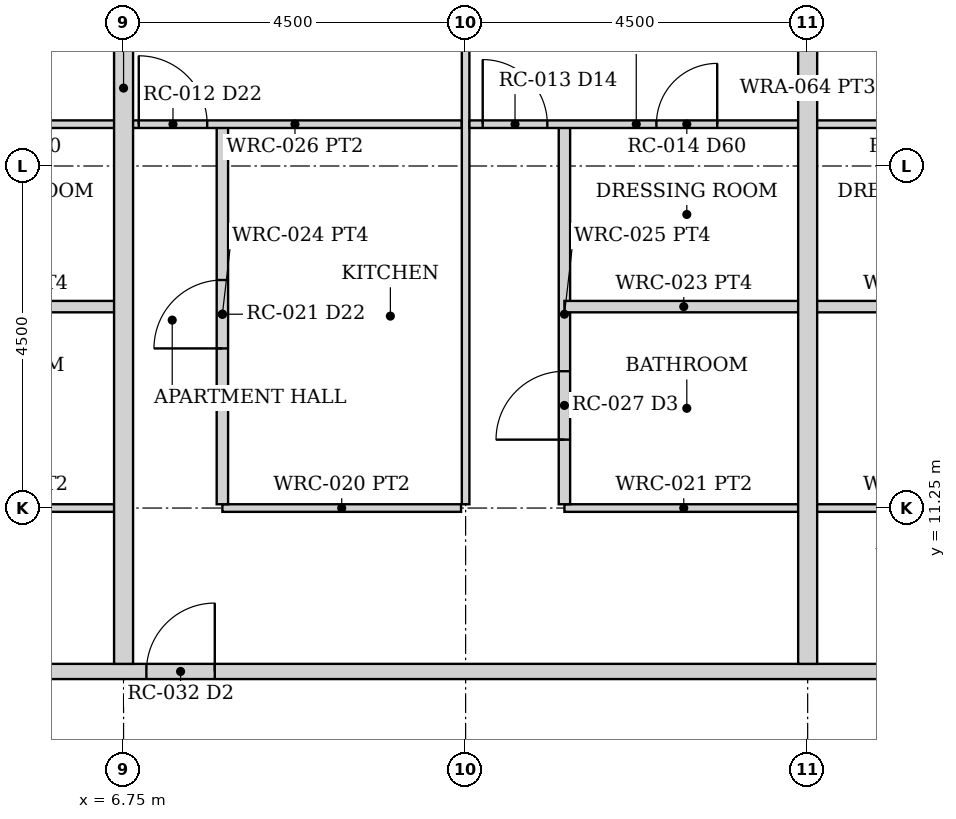
"""IFC4 building model, lengths in metres.
Left out: names, types, materials, properties, quantities, classifications, styles, units other than length and angle.
Written with IfcOpenShell. Run it as: python <this file> out.ifc"""

import sys

from ifc_helpers import new_model, si_unit, direction, frame, frame_2d, origin, place, context, subcontext, project, spatial, rectangle, extrude, element, fill, save


model = new_model("IFC4")
c1 = context("Model", 3, precision=1e-05, world=origin(), true_north=direction((0.0, 1.0)))
c2 = subcontext(c1, "Body", "Model", "MODEL_VIEW")
j1 = project(units=[si_unit("LENGTHUNIT", "METRE"), si_unit("PLANEANGLEUNIT", "RADIAN")], contexts=[c1])
p1 = place(None, origin())
s1 = spatial("IfcSite", under=j1, at=p1, CompositionType="ELEMENT")
p2 = place(p1, origin())
s2 = spatial("IfcBuilding", under=s1, at=p2, CompositionType="ELEMENT")
p3 = place(p2, frame((0.0, 0.0, 47.5)))
s3 = spatial("IfcBuildingStorey", under=s2, at=p3, CompositionType="ELEMENT", Elevation=47.5)
p4 = place(p3, frame((-24.55, 9.1, 0.0), z_axis=(0.0, 0.0, 1.0), x_axis=(1.0, 0.0, 0.0)))
e1 = element("IfcWall", 1, at=p4, inside=s3, PredefinedType="PARTITIONING", context=c2, shape_type="SweptSolid", body=[
    extrude(rectangle(XDim=49.1, YDim=0.2, at=frame_2d((24.55, 0.0))), origin(), (0.0, 0.0, 1.0), 2.373),
])
p5 = place(p4, frame((5.1, 0.0, 0.0)))
e2 = element("IfcOpeningElement", 2, at=p5, cuts=e1, PredefinedType="OPENING", context=c2, shape_type="SweptSolid", body=[
    extrude(rectangle(XDim=0.9, YDim=2.1, at=frame_2d((0.45, 1.05))), frame((0.0, 0.11, 0.0), z_axis=(0.0, -1.0, 0.0), x_axis=(1.0, 0.0, 0.0)), (0.0, 0.0, 1.0), 0.22),
])
p6 = place(p4, frame((13.6, 0.0, 0.0)))
e3 = element("IfcOpeningElement", 3, at=p6, cuts=e1, PredefinedType="OPENING", context=c2, shape_type="SweptSolid", body=[
    extrude(rectangle(XDim=0.9, YDim=2.1, at=frame_2d((0.45, 1.05))), frame((0.0, 0.11, 0.0), z_axis=(0.0, -1.0, 0.0), x_axis=(1.0, 0.0, 0.0)), (0.0, 0.0, 1.0), 0.22),
])
p7 = place(p4, frame((18.1, 0.0, 0.0)))
e4 = element("IfcOpeningElement", 4, at=p7, cuts=e1, PredefinedType="OPENING", context=c2, shape_type="SweptSolid", body=[
    extrude(rectangle(XDim=0.9, YDim=2.1, at=frame_2d((0.45, 1.05))), frame((0.0, 0.11, 0.0), z_axis=(0.0, -1.0, 0.0), x_axis=(1.0, 0.0, 0.0)), (0.0, 0.0, 1.0), 0.22),
])
p8 = place(p4, frame((31.6, 0.0, 0.0)))
e5 = element("IfcOpeningElement", 5, at=p8, cuts=e1, PredefinedType="OPENING", context=c2, shape_type="SweptSolid", body=[
    extrude(rectangle(XDim=0.9, YDim=2.1, at=frame_2d((0.45, 1.05))), frame((0.0, 0.11, 0.0), z_axis=(0.0, -1.0, 0.0), x_axis=(1.0, 0.0, 0.0)), (0.0, 0.0, 1.0), 0.22),
])
p9 = place(p4, frame((43.1, 0.0, 0.0)))
e6 = element("IfcOpeningElement", 6, at=p9, cuts=e1, PredefinedType="OPENING", context=c2, shape_type="SweptSolid", body=[
    extrude(rectangle(XDim=0.9, YDim=2.1, at=frame_2d((0.45, 1.05))), frame((0.0, 0.11, 0.0), z_axis=(0.0, -1.0, 0.0), x_axis=(1.0, 0.0, 0.0)), (0.0, 0.0, 1.0), 0.22),
])
p10 = place(p3, frame((3.55, 11.25, 0.0), z_axis=(0.0, 0.0, 1.0), x_axis=(1.0, 0.0, 0.0)))
e7 = element("IfcWall", 7, at=p10, inside=s3, PredefinedType="PARTITIONING", context=c2, shape_type="SweptSolid", body=[
    extrude(rectangle(XDim=3.14, YDim=0.1, at=frame_2d((1.57, 0.0))), origin(), (0.0, 0.0, 1.0), 2.373),
])
p11 = place(p3, frame((2.3, 16.3, 0.0), z_axis=(0.0, 0.0, 1.0), x_axis=(1.0, 0.0, 0.0)))
e8 = element("IfcWall", 8, at=p11, inside=s3, PredefinedType="PARTITIONING", context=c2, shape_type="SweptSolid", body=[
    extrude(rectangle(XDim=4.39, YDim=0.1, at=frame_2d((2.195, 0.0))), origin(), (0.0, 0.0, 1.0), 2.373),
])
p12 = place(p11, frame((0.175, 0.0, 0.0)))
e9 = element("IfcOpeningElement", 9, at=p12, cuts=e8, PredefinedType="OPENING", context=c2, shape_type="SweptSolid", body=[
    extrude(rectangle(XDim=0.85, YDim=2.1, at=frame_2d((0.425, 1.05))), frame((0.0, 0.06, 0.0), z_axis=(0.0, -1.0, 0.0), x_axis=(1.0, 0.0, 0.0)), (0.0, 0.0, 1.0), 0.12),
])
p13 = place(p11, frame((2.46, 0.0, 0.0)))
e10 = element("IfcOpeningElement", 10, at=p13, cuts=e8, PredefinedType="OPENING", context=c2, shape_type="SweptSolid", body=[
    extrude(rectangle(XDim=0.8, YDim=2.1, at=frame_2d((0.4, 1.05))), frame((0.0, 0.06, 0.0), z_axis=(0.0, -1.0, 0.0), x_axis=(1.0, 0.0, 0.0)), (0.0, 0.0, 1.0), 0.12),
])
p14 = place(p3, frame((3.55, 13.9, 0.0), z_axis=(0.0, 0.0, 1.0), x_axis=(1.0, 0.0, 0.0)))
e11 = element("IfcWall", 11, at=p14, inside=s3, PredefinedType="PARTITIONING", context=c2, shape_type="SweptSolid", body=[
    extrude(rectangle(XDim=3.14, YDim=0.15, at=frame_2d((1.57, 0.0))), origin(), (0.0, 0.0, 1.0), 2.373),
])
p15 = place(p3, frame((8.05, 11.25, 0.0), z_axis=(0.0, 0.0, 1.0), x_axis=(1.0, 0.0, 0.0)))
e12 = element("IfcWall", 12, at=p15, inside=s3, PredefinedType="PARTITIONING", context=c2, shape_type="SweptSolid", body=[
    extrude(rectangle(XDim=3.14, YDim=0.1, at=frame_2d((1.57, 0.0))), origin(), (0.0, 0.0, 1.0), 2.373),
])
p16 = place(p3, frame((8.05, 11.3, 0.0), z_axis=(0.0, 0.0, 1.0), x_axis=(0.0, 1.0, 0.0)))
e13 = element("IfcWall", 13, at=p16, inside=s3, PredefinedType="PARTITIONING", context=c2, shape_type="SweptSolid", body=[
    extrude(rectangle(XDim=5.0, YDim=0.15, at=frame_2d((2.5, 0.0))), origin(), (0.0, 0.0, 1.0), 2.373),
])
p17 = place(p16, frame((2.05, 0.0, 0.0)))
e14 = element("IfcOpeningElement", 14, at=p17, cuts=e13, PredefinedType="OPENING", context=c2, shape_type="SweptSolid", body=[
    extrude(rectangle(XDim=0.9, YDim=2.1, at=frame_2d((0.45, 1.05))), frame((0.0, 0.085, 0.0), z_axis=(0.0, -1.0, 0.0), x_axis=(1.0, 0.0, 0.0)), (0.0, 0.0, 1.0), 0.17),
])
p18 = place(p3, frame((6.81, 16.3, 0.0), z_axis=(0.0, 0.0, 1.0), x_axis=(1.0, 0.0, 0.0)))
e15 = element("IfcWall", 15, at=p18, inside=s3, PredefinedType="PARTITIONING", context=c2, shape_type="SweptSolid", body=[
    extrude(rectangle(XDim=4.39, YDim=0.1, at=frame_2d((2.195, 0.0))), origin(), (0.0, 0.0, 1.0), 2.373),
])
p19 = place(p18, frame((0.14, 0.0, 0.0)))
e16 = element("IfcOpeningElement", 16, at=p19, cuts=e15, PredefinedType="OPENING", context=c2, shape_type="SweptSolid", body=[
    extrude(rectangle(XDim=0.9, YDim=2.1, at=frame_2d((0.45, 1.05))), frame((0.0, 0.06, 0.0), z_axis=(0.0, -1.0, 0.0), x_axis=(1.0, 0.0, 0.0)), (0.0, 0.0, 1.0), 0.12),
])
p20 = place(p3, frame((11.25, 11.3, 0.0), z_axis=(0.0, 0.0, 1.0), x_axis=(0.0, 1.0, 0.0)))
e17 = element("IfcWall", 17, at=p20, inside=s3, PredefinedType="PARTITIONING", context=c2, shape_type="SweptSolid", body=[
    extrude(rectangle(XDim=13.05, YDim=0.1, at=frame_2d((6.525, 0.0))), origin(), (0.0, 0.0, 1.0), 2.373),
])
p21 = place(p3, frame((12.55, 11.25, 0.0), z_axis=(0.0, 0.0, 1.0), x_axis=(1.0, 0.0, 0.0)))
e18 = element("IfcWall", 18, at=p21, inside=s3, PredefinedType="PARTITIONING", context=c2, shape_type="SweptSolid", body=[
    extrude(rectangle(XDim=3.14, YDim=0.1, at=frame_2d((1.57, 0.0))), origin(), (0.0, 0.0, 1.0), 2.373),
])
p22 = place(p3, frame((12.55, 11.3, 0.0), z_axis=(0.0, 0.0, 1.0), x_axis=(0.0, 1.0, 0.0)))
e19 = element("IfcWall", 19, at=p22, inside=s3, PredefinedType="PARTITIONING", context=c2, shape_type="SweptSolid", body=[
    extrude(rectangle(XDim=5.0, YDim=0.15, at=frame_2d((2.5, 0.0))), origin(), (0.0, 0.0, 1.0), 2.373),
])
p23 = place(p22, frame((0.85, 0.0, 0.0)))
e20 = element("IfcOpeningElement", 20, at=p23, cuts=e19, PredefinedType="OPENING", context=c2, shape_type="SweptSolid", body=[
    extrude(rectangle(XDim=0.9, YDim=2.1, at=frame_2d((0.45, 1.05))), frame((0.0, 0.085, 0.0), z_axis=(0.0, -1.0, 0.0), x_axis=(1.0, 0.0, 0.0)), (0.0, 0.0, 1.0), 0.17),
])
p24 = place(p3, frame((11.3, 16.3, 0.0), z_axis=(0.0, 0.0, 1.0), x_axis=(1.0, 0.0, 0.0)))
e21 = element("IfcWall", 21, at=p24, inside=s3, PredefinedType="PARTITIONING", context=c2, shape_type="SweptSolid", body=[
    extrude(rectangle(XDim=4.39, YDim=0.1, at=frame_2d((2.195, 0.0))), origin(), (0.0, 0.0, 1.0), 2.373),
])
p25 = place(p24, frame((0.175, 0.0, 0.0)))
e22 = element("IfcOpeningElement", 22, at=p25, cuts=e21, PredefinedType="OPENING", context=c2, shape_type="SweptSolid", body=[
    extrude(rectangle(XDim=0.85, YDim=2.1, at=frame_2d((0.425, 1.05))), frame((0.0, 0.06, 0.0), z_axis=(0.0, -1.0, 0.0), x_axis=(1.0, 0.0, 0.0)), (0.0, 0.0, 1.0), 0.12),
])
p26 = place(p24, frame((2.46, 0.0, 0.0)))
e23 = element("IfcOpeningElement", 23, at=p26, cuts=e21, PredefinedType="OPENING", context=c2, shape_type="SweptSolid", body=[
    extrude(rectangle(XDim=0.8, YDim=2.1, at=frame_2d((0.4, 1.05))), frame((0.0, 0.06, 0.0), z_axis=(0.0, -1.0, 0.0), x_axis=(1.0, 0.0, 0.0)), (0.0, 0.0, 1.0), 0.12),
])
p27 = place(p3, frame((12.55, 13.9, 0.0), z_axis=(0.0, 0.0, 1.0), x_axis=(1.0, 0.0, 0.0)))
e24 = element("IfcWall", 24, at=p27, inside=s3, PredefinedType="PARTITIONING", context=c2, shape_type="SweptSolid", body=[
    extrude(rectangle(XDim=3.14, YDim=0.15, at=frame_2d((1.57, 0.0))), origin(), (0.0, 0.0, 1.0), 2.373),
])
p28 = place(p3, frame((15.81, 11.25, 0.0), z_axis=(0.0, 0.0, 1.0), x_axis=(1.0, 0.0, 0.0)))
e25 = element("IfcWall", 25, at=p28, inside=s3, PredefinedType="PARTITIONING", context=c2, shape_type="SweptSolid", body=[
    extrude(rectangle(XDim=3.14, YDim=0.1, at=frame_2d((1.57, 0.0))), origin(), (0.0, 0.0, 1.0), 2.373),
])
p29 = place(p3, frame((15.81, 16.3, 0.0), z_axis=(0.0, 0.0, 1.0), x_axis=(1.0, 0.0, 0.0)))
e26 = element("IfcWall", 26, at=p29, inside=s3, PredefinedType="PARTITIONING", context=c2, shape_type="SweptSolid", body=[
    extrude(rectangle(XDim=4.39, YDim=0.1, at=frame_2d((2.195, 0.0))), origin(), (0.0, 0.0, 1.0), 2.373),
])
p30 = place(p29, frame((3.365, 0.0, 0.0)))
e27 = element("IfcOpeningElement", 27, at=p30, cuts=e26, PredefinedType="OPENING", context=c2, shape_type="SweptSolid", body=[
    extrude(rectangle(XDim=0.85, YDim=2.1, at=frame_2d((0.425, 1.05))), frame((0.0, 0.06, 0.0), z_axis=(0.0, -1.0, 0.0), x_axis=(1.0, 0.0, 0.0)), (0.0, 0.0, 1.0), 0.12),
])
p31 = place(p29, frame((1.13, 0.0, 0.0)))
e28 = element("IfcOpeningElement", 28, at=p31, cuts=e26, PredefinedType="OPENING", context=c2, shape_type="SweptSolid", body=[
    extrude(rectangle(XDim=0.8, YDim=2.1, at=frame_2d((0.4, 1.05))), frame((0.0, 0.06, 0.0), z_axis=(0.0, -1.0, 0.0), x_axis=(1.0, 0.0, 0.0)), (0.0, 0.0, 1.0), 0.12),
])
p32 = place(p3, frame((15.81, 13.9, 0.0), z_axis=(0.0, 0.0, 1.0), x_axis=(1.0, 0.0, 0.0)))
e29 = element("IfcWall", 29, at=p32, inside=s3, PredefinedType="PARTITIONING", context=c2, shape_type="SweptSolid", body=[
    extrude(rectangle(XDim=3.14, YDim=0.15, at=frame_2d((1.57, 0.0))), origin(), (0.0, 0.0, 1.0), 2.373),
])
for number, where, z_axis, x_axis in (
    (30, (6.75, 9.2, 0.0), (0.0, 0.0, 1.0), (0.0, 1.0, 0.0)),
    (31, (15.75, 9.2, 0.0), (0.0, 0.0, 1.0), (0.0, 1.0, 0.0)),
):
    element("IfcWall", number, at=place(p3, frame(where, z_axis=z_axis, x_axis=x_axis)), inside=s3, PredefinedType="PARTITIONING", context=c2, shape_type="SweptSolid", body=[
        extrude(rectangle(XDim=15.15, YDim=0.25, at=frame_2d((7.575, 0.0))), origin(), (0.0, 0.0, 1.0), 2.373),
    ])
p33 = place(p8, origin())
e32 = element("IfcDoor", 32, at=p33, inside=s3, OperationType="SINGLE_SWING_RIGHT", PredefinedType="DOOR", context=c2, shape_type="SweptSolid", body=[
    extrude(rectangle(XDim=0.9, YDim=2.1, at=frame_2d((0.45, 1.05))), frame((0.0, 0.025, 0.0), z_axis=(0.0, -1.0, 0.0), x_axis=(1.0, 0.0, 0.0)), (0.0, 0.0, 1.0), 0.05),
])
fill(e5, e32)
p34 = place(p17, origin())
e33 = element("IfcDoor", 33, at=p34, inside=s3, OperationType="SINGLE_SWING_LEFT", PredefinedType="DOOR", context=c2, shape_type="SweptSolid", body=[
    extrude(rectangle(XDim=0.9, YDim=2.1, at=frame_2d((0.45, 1.05))), frame((0.0, 0.025, 0.0), z_axis=(0.0, -1.0, 0.0), x_axis=(1.0, 0.0, 0.0)), (0.0, 0.0, 1.0), 0.05),
])
fill(e14, e33)
p35 = place(p19, origin())
e34 = element("IfcDoor", 34, at=p35, inside=s3, OperationType="SINGLE_SWING_LEFT", PredefinedType="DOOR", context=c2, shape_type="SweptSolid", body=[
    extrude(rectangle(XDim=0.9, YDim=2.1, at=frame_2d((0.45, 1.05))), frame((0.0, 0.025, 0.0), z_axis=(0.0, -1.0, 0.0), x_axis=(1.0, 0.0, 0.0)), (0.0, 0.0, 1.0), 0.05),
])
fill(e16, e34)
p36 = place(p25, origin())
e35 = element("IfcDoor", 35, at=p36, inside=s3, OperationType="SINGLE_SWING_LEFT", PredefinedType="DOOR", context=c2, shape_type="SweptSolid", body=[
    extrude(rectangle(XDim=0.85, YDim=2.1, at=frame_2d((0.425, 1.05))), frame((0.0, 0.025, 0.0), z_axis=(0.0, -1.0, 0.0), x_axis=(1.0, 0.0, 0.0)), (0.0, 0.0, 1.0), 0.05),
])
fill(e22, e35)
p37 = place(p23, origin())
e36 = element("IfcDoor", 36, at=p37, inside=s3, OperationType="SINGLE_SWING_LEFT", PredefinedType="DOOR", context=c2, shape_type="SweptSolid", body=[
    extrude(rectangle(XDim=0.9, YDim=2.1, at=frame_2d((0.45, 1.05))), frame((0.0, 0.025, 0.0), z_axis=(0.0, -1.0, 0.0), x_axis=(1.0, 0.0, 0.0)), (0.0, 0.0, 1.0), 0.05),
])
fill(e20, e36)
p38 = place(p26, origin())
e37 = element("IfcDoor", 37, at=p38, inside=s3, OperationType="SINGLE_SWING_RIGHT", PredefinedType="DOOR", context=c2, shape_type="SweptSolid", body=[
    extrude(rectangle(XDim=0.8, YDim=2.1, at=frame_2d((0.4, 1.05))), frame((0.0, 0.025, 0.0), z_axis=(0.0, -1.0, 0.0), x_axis=(1.0, 0.0, 0.0)), (0.0, 0.0, 1.0), 0.05),
])
fill(e23, e37)
save(model, sys.argv[1])
